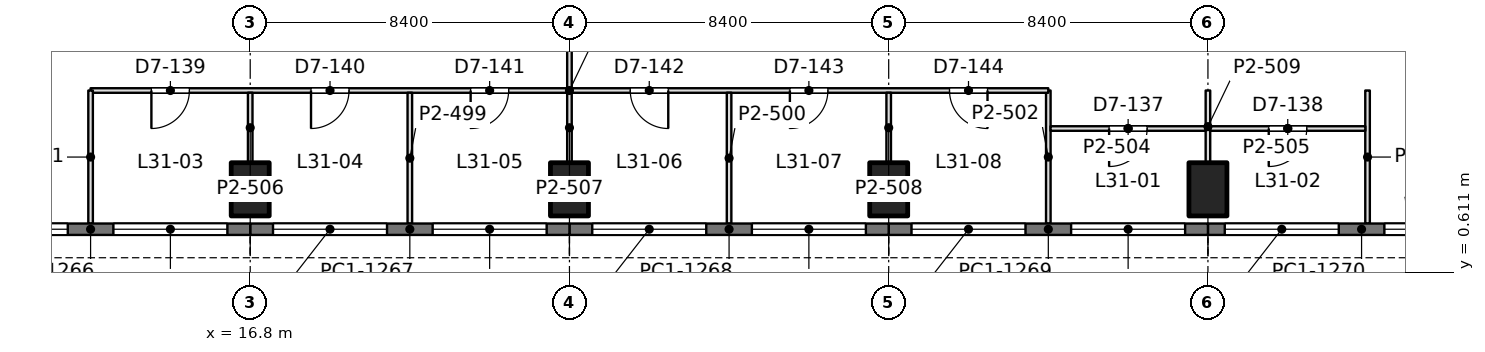
"""IFC4 building model, lengths in metres.
Left out: names, types, materials, properties, quantities, classifications, styles, units other than length and angle.
Written with IfcOpenShell. Run it as: python <this file> out.ifc"""

import sys

from ifc_helpers import new_model, si_unit, direction, frame, frame_2d, origin, origin_2d, place, context, subcontext, project, spatial, rectangle, extrude, element, fill, save


model = new_model("IFC4")
c1 = context("Model", 3, precision=1e-05, world=origin(), true_north=direction((0.0, 1.0)))
c2 = subcontext(c1, "Body", "Model", "MODEL_VIEW")
j1 = project(units=[si_unit("LENGTHUNIT", "METRE"), si_unit("PLANEANGLEUNIT", "RADIAN")], contexts=[c1])
p1 = place(None, origin())
s1 = spatial("IfcSite", under=j1, at=p1, CompositionType="ELEMENT")
p2 = place(p1, origin())
s2 = spatial("IfcBuilding", under=s1, at=p2, CompositionType="ELEMENT")
p3 = place(p2, frame((0.0, 0.0, 138.6)))
s3 = spatial("IfcBuildingStorey", under=s2, at=p3, CompositionType="ELEMENT", Elevation=138.6)
for number, where, z_axis, x_axis in (
    (1, (16.8, 2.8, 0.0), (0.0, 0.0, 1.0), (1.0, 0.0, 0.0)),
    (2, (25.2, 2.8, 0.0), (0.0, 0.0, 1.0), (1.0, 0.0, 0.0)),
    (3, (33.6, 2.8, 0.0), (0.0, 0.0, 1.0), (1.0, 0.0, 0.0)),
    (4, (42.0, 2.8, 0.0), (0.0, 0.0, 1.0), (1.0, 0.0, 0.0)),
):
    element("IfcColumn", number, at=place(p3, frame(where, z_axis=z_axis, x_axis=x_axis)), inside=s3, PredefinedType="COLUMN", context=c2, shape_type="SweptSolid", body=[
        extrude(rectangle(XDim=1.0, YDim=1.4, at=origin_2d()), origin(), (0.0, 0.0, 1.0), 4.2),
    ])
p4 = place(p3, frame((50.085, 1.75, 0.0), z_axis=(0.0, 0.0, 1.0), x_axis=(-1.0, 0.0, 0.0)))
e5 = element("IfcWall", 5, at=p4, inside=s3, PredefinedType="SOLIDWALL", context=c2, shape_type="SweptSolid", body=[
    extrude(rectangle(XDim=8.085, YDim=0.3, at=frame_2d((4.042, 0.0))), origin(), (0.0, 0.0, 1.0), 4.05),
])
p5 = place(p4, frame((0.443, 0.0, 0.9)))
e6 = element("IfcOpeningElement", 6, at=p5, cuts=e5, PredefinedType="OPENING", context=c2, shape_type="SweptSolid", body=[
    extrude(rectangle(XDim=3.0, YDim=1.9, at=frame_2d((1.5, 0.95))), frame((0.0, 0.16, 0.0), z_axis=(0.0, -1.0, 0.0), x_axis=(1.0, 0.0, 0.0)), (0.0, 0.0, 1.0), 0.32),
])
p6 = place(p4, frame((4.643, 0.0, 0.9)))
e7 = element("IfcOpeningElement", 7, at=p6, cuts=e5, PredefinedType="OPENING", context=c2, shape_type="SweptSolid", body=[
    extrude(rectangle(XDim=3.0, YDim=1.9, at=frame_2d((1.5, 0.95))), frame((0.0, 0.16, 0.0), z_axis=(0.0, -1.0, 0.0), x_axis=(1.0, 0.0, 0.0)), (0.0, 0.0, 1.0), 0.32),
])
p7 = place(p3, frame((42.0, 1.75, 0.0), z_axis=(0.0, 0.0, 1.0), x_axis=(-1.0, 0.0, 0.0)))
e8 = element("IfcWall", 8, at=p7, inside=s3, PredefinedType="SOLIDWALL", context=c2, shape_type="SweptSolid", body=[
    extrude(rectangle(XDim=8.4, YDim=0.3, at=frame_2d((4.2, 0.0))), origin(), (0.0, 0.0, 1.0), 4.05),
])
p8 = place(p7, frame((0.6, 0.0, 0.9)))
e9 = element("IfcOpeningElement", 9, at=p8, cuts=e8, PredefinedType="OPENING", context=c2, shape_type="SweptSolid", body=[
    extrude(rectangle(XDim=3.0, YDim=1.9, at=frame_2d((1.5, 0.95))), frame((0.0, 0.16, 0.0), z_axis=(0.0, -1.0, 0.0), x_axis=(1.0, 0.0, 0.0)), (0.0, 0.0, 1.0), 0.32),
])
p9 = place(p7, frame((4.8, 0.0, 0.9)))
e10 = element("IfcOpeningElement", 10, at=p9, cuts=e8, PredefinedType="OPENING", context=c2, shape_type="SweptSolid", body=[
    extrude(rectangle(XDim=3.0, YDim=1.9, at=frame_2d((1.5, 0.95))), frame((0.0, 0.16, 0.0), z_axis=(0.0, -1.0, 0.0), x_axis=(1.0, 0.0, 0.0)), (0.0, 0.0, 1.0), 0.32),
])
p10 = place(p3, frame((33.6, 1.75, 0.0), z_axis=(0.0, 0.0, 1.0), x_axis=(-1.0, 0.0, 0.0)))
e11 = element("IfcWall", 11, at=p10, inside=s3, PredefinedType="SOLIDWALL", context=c2, shape_type="SweptSolid", body=[
    extrude(rectangle(XDim=8.4, YDim=0.3, at=frame_2d((4.2, 0.0))), origin(), (0.0, 0.0, 1.0), 4.05),
])
p11 = place(p10, frame((0.6, 0.0, 0.9)))
e12 = element("IfcOpeningElement", 12, at=p11, cuts=e11, PredefinedType="OPENING", context=c2, shape_type="SweptSolid", body=[
    extrude(rectangle(XDim=3.0, YDim=1.9, at=frame_2d((1.5, 0.95))), frame((0.0, 0.16, 0.0), z_axis=(0.0, -1.0, 0.0), x_axis=(1.0, 0.0, 0.0)), (0.0, 0.0, 1.0), 0.32),
])
p12 = place(p10, frame((4.8, 0.0, 0.9)))
e13 = element("IfcOpeningElement", 13, at=p12, cuts=e11, PredefinedType="OPENING", context=c2, shape_type="SweptSolid", body=[
    extrude(rectangle(XDim=3.0, YDim=1.9, at=frame_2d((1.5, 0.95))), frame((0.0, 0.16, 0.0), z_axis=(0.0, -1.0, 0.0), x_axis=(1.0, 0.0, 0.0)), (0.0, 0.0, 1.0), 0.32),
])
p13 = place(p3, frame((25.2, 1.75, 0.0), z_axis=(0.0, 0.0, 1.0), x_axis=(-1.0, 0.0, 0.0)))
e14 = element("IfcWall", 14, at=p13, inside=s3, PredefinedType="SOLIDWALL", context=c2, shape_type="SweptSolid", body=[
    extrude(rectangle(XDim=8.4, YDim=0.3, at=frame_2d((4.2, 0.0))), origin(), (0.0, 0.0, 1.0), 4.05),
])
p14 = place(p13, frame((0.6, 0.0, 0.9)))
e15 = element("IfcOpeningElement", 15, at=p14, cuts=e14, PredefinedType="OPENING", context=c2, shape_type="SweptSolid", body=[
    extrude(rectangle(XDim=3.0, YDim=1.9, at=frame_2d((1.5, 0.95))), frame((0.0, 0.16, 0.0), z_axis=(0.0, -1.0, 0.0), x_axis=(1.0, 0.0, 0.0)), (0.0, 0.0, 1.0), 0.32),
])
p15 = place(p13, frame((4.8, 0.0, 0.9)))
e16 = element("IfcOpeningElement", 16, at=p15, cuts=e14, PredefinedType="OPENING", context=c2, shape_type="SweptSolid", body=[
    extrude(rectangle(XDim=3.0, YDim=1.9, at=frame_2d((1.5, 0.95))), frame((0.0, 0.16, 0.0), z_axis=(0.0, -1.0, 0.0), x_axis=(1.0, 0.0, 0.0)), (0.0, 0.0, 1.0), 0.32),
])
p16 = place(p3, frame((16.8, 1.75, 0.0), z_axis=(0.0, 0.0, 1.0), x_axis=(-1.0, 0.0, 0.0)))
e17 = element("IfcWall", 17, at=p16, inside=s3, PredefinedType="SOLIDWALL", context=c2, shape_type="SweptSolid", body=[
    extrude(rectangle(XDim=8.4, YDim=0.3, at=frame_2d((4.2, 0.0))), origin(), (0.0, 0.0, 1.0), 4.05),
])
p17 = place(p16, frame((0.6, 0.0, 0.9)))
e18 = element("IfcOpeningElement", 18, at=p17, cuts=e17, PredefinedType="OPENING", context=c2, shape_type="SweptSolid", body=[
    extrude(rectangle(XDim=3.0, YDim=1.9, at=frame_2d((1.5, 0.95))), frame((0.0, 0.16, 0.0), z_axis=(0.0, -1.0, 0.0), x_axis=(1.0, 0.0, 0.0)), (0.0, 0.0, 1.0), 0.32),
])
p18 = place(p16, frame((4.8, 0.0, 0.9)))
e19 = element("IfcOpeningElement", 19, at=p18, cuts=e17, PredefinedType="OPENING", context=c2, shape_type="SweptSolid", body=[
    extrude(rectangle(XDim=3.0, YDim=1.9, at=frame_2d((1.5, 0.95))), frame((0.0, 0.16, 0.0), z_axis=(0.0, -1.0, 0.0), x_axis=(1.0, 0.0, 0.0)), (0.0, 0.0, 1.0), 0.32),
])
p19 = place(p3, frame((37.858, 4.4, 0.0), z_axis=(0.0, 0.0, 1.0), x_axis=(1.0, 0.0, 0.0)))
e20 = element("IfcWall", 20, at=p19, inside=s3, PredefinedType="PARTITIONING", context=c2, shape_type="SweptSolid", body=[
    extrude(rectangle(XDim=4.084, YDim=0.12, at=frame_2d((2.042, 0.0))), origin(), (0.0, 0.0, 1.0), 3.55),
])
p20 = place(p19, frame((1.542, 0.0, 0.0)))
e21 = element("IfcOpeningElement", 21, at=p20, cuts=e20, PredefinedType="OPENING", context=c2, shape_type="SweptSolid", body=[
    extrude(rectangle(XDim=1.0, YDim=2.4, at=frame_2d((0.5, 1.2))), frame((0.0, 0.07, 0.0), z_axis=(0.0, -1.0, 0.0), x_axis=(1.0, 0.0, 0.0)), (0.0, 0.0, 1.0), 0.14),
])
p21 = place(p3, frame((42.058, 4.4, 0.0), z_axis=(0.0, 0.0, 1.0), x_axis=(1.0, 0.0, 0.0)))
e22 = element("IfcWall", 22, at=p21, inside=s3, PredefinedType="PARTITIONING", context=c2, shape_type="SweptSolid", body=[
    extrude(rectangle(XDim=4.084, YDim=0.12, at=frame_2d((2.042, 0.0))), origin(), (0.0, 0.0, 1.0), 3.55),
])
p22 = place(p21, frame((1.542, 0.0, 0.0)))
e23 = element("IfcOpeningElement", 23, at=p22, cuts=e22, PredefinedType="OPENING", context=c2, shape_type="SweptSolid", body=[
    extrude(rectangle(XDim=1.0, YDim=2.4, at=frame_2d((0.5, 1.2))), frame((0.0, 0.07, 0.0), z_axis=(0.0, -1.0, 0.0), x_axis=(1.0, 0.0, 0.0)), (0.0, 0.0, 1.0), 0.14),
])
p23 = place(p3, frame((12.6, 5.4, 0.0), z_axis=(0.0, 0.0, 1.0), x_axis=(1.0, 0.0, 0.0)))
e24 = element("IfcWall", 24, at=p23, inside=s3, PredefinedType="PARTITIONING", context=c2, shape_type="SweptSolid", body=[
    extrude(rectangle(XDim=25.2, YDim=0.12, at=frame_2d((12.6, 0.0))), origin(), (0.0, 0.0, 1.0), 3.55),
])
p24 = place(p23, frame((1.6, 0.0, 0.0)))
e25 = element("IfcOpeningElement", 25, at=p24, cuts=e24, PredefinedType="OPENING", context=c2, shape_type="SweptSolid", body=[
    extrude(rectangle(XDim=1.0, YDim=2.4, at=frame_2d((0.5, 1.2))), frame((0.0, 0.07, 0.0), z_axis=(0.0, -1.0, 0.0), x_axis=(1.0, 0.0, 0.0)), (0.0, 0.0, 1.0), 0.14),
])
p25 = place(p23, frame((5.8, 0.0, 0.0)))
e26 = element("IfcOpeningElement", 26, at=p25, cuts=e24, PredefinedType="OPENING", context=c2, shape_type="SweptSolid", body=[
    extrude(rectangle(XDim=1.0, YDim=2.4, at=frame_2d((0.5, 1.2))), frame((0.0, 0.07, 0.0), z_axis=(0.0, -1.0, 0.0), x_axis=(1.0, 0.0, 0.0)), (0.0, 0.0, 1.0), 0.14),
])
p26 = place(p23, frame((10.0, 0.0, 0.0)))
e27 = element("IfcOpeningElement", 27, at=p26, cuts=e24, PredefinedType="OPENING", context=c2, shape_type="SweptSolid", body=[
    extrude(rectangle(XDim=1.0, YDim=2.4, at=frame_2d((0.5, 1.2))), frame((0.0, 0.07, 0.0), z_axis=(0.0, -1.0, 0.0), x_axis=(1.0, 0.0, 0.0)), (0.0, 0.0, 1.0), 0.14),
])
p27 = place(p23, frame((14.2, 0.0, 0.0)))
e28 = element("IfcOpeningElement", 28, at=p27, cuts=e24, PredefinedType="OPENING", context=c2, shape_type="SweptSolid", body=[
    extrude(rectangle(XDim=1.0, YDim=2.4, at=frame_2d((0.5, 1.2))), frame((0.0, 0.07, 0.0), z_axis=(0.0, -1.0, 0.0), x_axis=(1.0, 0.0, 0.0)), (0.0, 0.0, 1.0), 0.14),
])
p28 = place(p23, frame((18.4, 0.0, 0.0)))
e29 = element("IfcOpeningElement", 29, at=p28, cuts=e24, PredefinedType="OPENING", context=c2, shape_type="SweptSolid", body=[
    extrude(rectangle(XDim=1.0, YDim=2.4, at=frame_2d((0.5, 1.2))), frame((0.0, 0.07, 0.0), z_axis=(0.0, -1.0, 0.0), x_axis=(1.0, 0.0, 0.0)), (0.0, 0.0, 1.0), 0.14),
])
p29 = place(p23, frame((22.6, 0.0, 0.0)))
e30 = element("IfcOpeningElement", 30, at=p29, cuts=e24, PredefinedType="OPENING", context=c2, shape_type="SweptSolid", body=[
    extrude(rectangle(XDim=1.0, YDim=2.4, at=frame_2d((0.5, 1.2))), frame((0.0, 0.07, 0.0), z_axis=(0.0, -1.0, 0.0), x_axis=(1.0, 0.0, 0.0)), (0.0, 0.0, 1.0), 0.14),
])
p30 = place(p3, frame((12.6, 1.898, 0.0), z_axis=(0.0, 0.0, 1.0), x_axis=(0.0, 1.0, 0.0)))
e31 = element("IfcWall", 31, at=p30, inside=s3, PredefinedType="PARTITIONING", context=c2, shape_type="SweptSolid", body=[
    extrude(rectangle(XDim=3.502, YDim=0.12, at=frame_2d((1.751, 0.0))), origin(), (0.0, 0.0, 1.0), 3.56),
])
p31 = place(p3, frame((16.8, 3.499, 0.0), z_axis=(0.0, 0.0, 1.0), x_axis=(0.0, 1.0, 0.0)))
e32 = element("IfcWall", 32, at=p31, inside=s3, PredefinedType="PARTITIONING", context=c2, shape_type="SweptSolid", body=[
    extrude(rectangle(XDim=1.843, YDim=0.12, at=frame_2d((0.921, 0.0))), origin(), (0.0, 0.0, 1.0), 3.55),
])
p32 = place(p3, frame((21.0, 1.898, 0.0), z_axis=(0.0, 0.0, 1.0), x_axis=(0.0, 1.0, 0.0)))
e33 = element("IfcWall", 33, at=p32, inside=s3, PredefinedType="PARTITIONING", context=c2, shape_type="SweptSolid", body=[
    extrude(rectangle(XDim=3.444, YDim=0.12, at=frame_2d((1.722, 0.0))), origin(), (0.0, 0.0, 1.0), 3.56),
])
p33 = place(p3, frame((25.2, 3.499, 0.0), z_axis=(0.0, 0.0, 1.0), x_axis=(0.0, 1.0, 0.0)))
e34 = element("IfcWall", 34, at=p33, inside=s3, PredefinedType="PARTITIONING", context=c2, shape_type="SweptSolid", body=[
    extrude(rectangle(XDim=1.843, YDim=0.12, at=frame_2d((0.921, 0.0))), origin(), (0.0, 0.0, 1.0), 3.55),
])
p34 = place(p3, frame((29.4, 1.898, 0.0), z_axis=(0.0, 0.0, 1.0), x_axis=(0.0, 1.0, 0.0)))
e35 = element("IfcWall", 35, at=p34, inside=s3, PredefinedType="PARTITIONING", context=c2, shape_type="SweptSolid", body=[
    extrude(rectangle(XDim=3.444, YDim=0.12, at=frame_2d((1.722, 0.0))), origin(), (0.0, 0.0, 1.0), 3.56),
])
p35 = place(p3, frame((33.6, 3.499, 0.0), z_axis=(0.0, 0.0, 1.0), x_axis=(0.0, 1.0, 0.0)))
e36 = element("IfcWall", 36, at=p35, inside=s3, PredefinedType="PARTITIONING", context=c2, shape_type="SweptSolid", body=[
    extrude(rectangle(XDim=1.843, YDim=0.12, at=frame_2d((0.921, 0.0))), origin(), (0.0, 0.0, 1.0), 3.55),
])
p36 = place(p3, frame((37.8, 1.898, 0.0), z_axis=(0.0, 0.0, 1.0), x_axis=(0.0, 1.0, 0.0)))
e37 = element("IfcWall", 37, at=p36, inside=s3, PredefinedType="PARTITIONING", context=c2, shape_type="SweptSolid", body=[
    extrude(rectangle(XDim=3.502, YDim=0.12, at=frame_2d((1.751, 0.0))), origin(), (0.0, 0.0, 1.0), 3.56),
])
p37 = place(p3, frame((42.0, 3.499, 0.0), z_axis=(0.0, 0.0, 1.0), x_axis=(0.0, 1.0, 0.0)))
e38 = element("IfcWall", 38, at=p37, inside=s3, PredefinedType="PARTITIONING", context=c2, shape_type="SweptSolid", body=[
    extrude(rectangle(XDim=1.901, YDim=0.12, at=frame_2d((0.95, 0.0))), origin(), (0.0, 0.0, 1.0), 3.55),
])
p38 = place(p3, frame((46.2, 1.898, 0.0), z_axis=(0.0, 0.0, 1.0), x_axis=(0.0, 1.0, 0.0)))
e39 = element("IfcWall", 39, at=p38, inside=s3, PredefinedType="PARTITIONING", context=c2, shape_type="SweptSolid", body=[
    extrude(rectangle(XDim=3.502, YDim=0.12, at=frame_2d((1.751, 0.0))), origin(), (0.0, 0.0, 1.0), 3.56),
])
p39 = place(p3, frame((25.2, 5.458, 0.0), z_axis=(0.0, 0.0, 1.0), x_axis=(0.0, 1.0, 0.0)))
e40 = element("IfcWall", 40, at=p39, inside=s3, PredefinedType="PARTITIONING", context=c2, shape_type="SweptSolid", body=[
    extrude(rectangle(XDim=2.243, YDim=0.12, at=frame_2d((1.122, 0.0))), origin(), (0.0, 0.0, 1.0), 3.55),
])
p40 = place(p5, origin())
e41 = element("IfcWindow", 41, at=p40, inside=s3, PartitioningType="SINGLE_PANEL", PredefinedType="WINDOW", context=c2, shape_type="SweptSolid", body=[
    extrude(rectangle(XDim=3.0, YDim=1.9, at=frame_2d((1.5, 0.95))), frame((0.0, 0.03, 0.0), z_axis=(0.0, -1.0, 0.0), x_axis=(1.0, 0.0, 0.0)), (0.0, 0.0, 1.0), 0.06),
])
fill(e6, e41)
p41 = place(p6, origin())
e42 = element("IfcWindow", 42, at=p41, inside=s3, PartitioningType="SINGLE_PANEL", PredefinedType="WINDOW", context=c2, shape_type="SweptSolid", body=[
    extrude(rectangle(XDim=3.0, YDim=1.9, at=frame_2d((1.5, 0.95))), frame((0.0, 0.03, 0.0), z_axis=(0.0, -1.0, 0.0), x_axis=(1.0, 0.0, 0.0)), (0.0, 0.0, 1.0), 0.06),
])
fill(e7, e42)
p42 = place(p8, origin())
e43 = element("IfcWindow", 43, at=p42, inside=s3, PartitioningType="SINGLE_PANEL", PredefinedType="WINDOW", context=c2, shape_type="SweptSolid", body=[
    extrude(rectangle(XDim=3.0, YDim=1.9, at=frame_2d((1.5, 0.95))), frame((0.0, 0.03, 0.0), z_axis=(0.0, -1.0, 0.0), x_axis=(1.0, 0.0, 0.0)), (0.0, 0.0, 1.0), 0.06),
])
fill(e9, e43)
p43 = place(p9, origin())
e44 = element("IfcWindow", 44, at=p43, inside=s3, PartitioningType="SINGLE_PANEL", PredefinedType="WINDOW", context=c2, shape_type="SweptSolid", body=[
    extrude(rectangle(XDim=3.0, YDim=1.9, at=frame_2d((1.5, 0.95))), frame((0.0, 0.03, 0.0), z_axis=(0.0, -1.0, 0.0), x_axis=(1.0, 0.0, 0.0)), (0.0, 0.0, 1.0), 0.06),
])
fill(e10, e44)
p44 = place(p11, origin())
e45 = element("IfcWindow", 45, at=p44, inside=s3, PartitioningType="SINGLE_PANEL", PredefinedType="WINDOW", context=c2, shape_type="SweptSolid", body=[
    extrude(rectangle(XDim=3.0, YDim=1.9, at=frame_2d((1.5, 0.95))), frame((0.0, 0.03, 0.0), z_axis=(0.0, -1.0, 0.0), x_axis=(1.0, 0.0, 0.0)), (0.0, 0.0, 1.0), 0.06),
])
fill(e12, e45)
p45 = place(p12, origin())
e46 = element("IfcWindow", 46, at=p45, inside=s3, PartitioningType="SINGLE_PANEL", PredefinedType="WINDOW", context=c2, shape_type="SweptSolid", body=[
    extrude(rectangle(XDim=3.0, YDim=1.9, at=frame_2d((1.5, 0.95))), frame((0.0, 0.03, 0.0), z_axis=(0.0, -1.0, 0.0), x_axis=(1.0, 0.0, 0.0)), (0.0, 0.0, 1.0), 0.06),
])
fill(e13, e46)
p46 = place(p14, origin())
e47 = element("IfcWindow", 47, at=p46, inside=s3, PartitioningType="SINGLE_PANEL", PredefinedType="WINDOW", context=c2, shape_type="SweptSolid", body=[
    extrude(rectangle(XDim=3.0, YDim=1.9, at=frame_2d((1.5, 0.95))), frame((0.0, 0.03, 0.0), z_axis=(0.0, -1.0, 0.0), x_axis=(1.0, 0.0, 0.0)), (0.0, 0.0, 1.0), 0.06),
])
fill(e15, e47)
p47 = place(p15, origin())
e48 = element("IfcWindow", 48, at=p47, inside=s3, PartitioningType="SINGLE_PANEL", PredefinedType="WINDOW", context=c2, shape_type="SweptSolid", body=[
    extrude(rectangle(XDim=3.0, YDim=1.9, at=frame_2d((1.5, 0.95))), frame((0.0, 0.03, 0.0), z_axis=(0.0, -1.0, 0.0), x_axis=(1.0, 0.0, 0.0)), (0.0, 0.0, 1.0), 0.06),
])
fill(e16, e48)
p48 = place(p17, origin())
e49 = element("IfcWindow", 49, at=p48, inside=s3, PartitioningType="SINGLE_PANEL", PredefinedType="WINDOW", context=c2, shape_type="SweptSolid", body=[
    extrude(rectangle(XDim=3.0, YDim=1.9, at=frame_2d((1.5, 0.95))), frame((0.0, 0.03, 0.0), z_axis=(0.0, -1.0, 0.0), x_axis=(1.0, 0.0, 0.0)), (0.0, 0.0, 1.0), 0.06),
])
fill(e18, e49)
p49 = place(p18, origin())
e50 = element("IfcWindow", 50, at=p49, inside=s3, PartitioningType="SINGLE_PANEL", PredefinedType="WINDOW", context=c2, shape_type="SweptSolid", body=[
    extrude(rectangle(XDim=3.0, YDim=1.9, at=frame_2d((1.5, 0.95))), frame((0.0, 0.03, 0.0), z_axis=(0.0, -1.0, 0.0), x_axis=(1.0, 0.0, 0.0)), (0.0, 0.0, 1.0), 0.06),
])
fill(e19, e50)
p50 = place(p20, frame((1.0, 0.0, 0.0), z_axis=(0.0, 0.0, 1.0), x_axis=(-1.0, 0.0, 0.0)))
e51 = element("IfcDoor", 51, at=p50, inside=s3, OperationType="SINGLE_SWING_RIGHT", PredefinedType="DOOR", context=c2, shape_type="SweptSolid", body=[
    extrude(rectangle(XDim=1.0, YDim=2.4, at=frame_2d((0.5, 1.2))), frame((0.0, 0.025, 0.0), z_axis=(0.0, -1.0, 0.0), x_axis=(1.0, 0.0, 0.0)), (0.0, 0.0, 1.0), 0.05),
])
fill(e21, e51)
p51 = place(p22, frame((1.0, 0.0, 0.0), z_axis=(0.0, 0.0, 1.0), x_axis=(-1.0, 0.0, 0.0)))
e52 = element("IfcDoor", 52, at=p51, inside=s3, OperationType="SINGLE_SWING_RIGHT", PredefinedType="DOOR", context=c2, shape_type="SweptSolid", body=[
    extrude(rectangle(XDim=1.0, YDim=2.4, at=frame_2d((0.5, 1.2))), frame((0.0, 0.025, 0.0), z_axis=(0.0, -1.0, 0.0), x_axis=(1.0, 0.0, 0.0)), (0.0, 0.0, 1.0), 0.05),
])
fill(e23, e52)
p52 = place(p24, frame((1.0, 0.0, 0.0), z_axis=(0.0, 0.0, 1.0), x_axis=(-1.0, 0.0, 0.0)))
e53 = element("IfcDoor", 53, at=p52, inside=s3, OperationType="SINGLE_SWING_RIGHT", PredefinedType="DOOR", context=c2, shape_type="SweptSolid", body=[
    extrude(rectangle(XDim=1.0, YDim=2.4, at=frame_2d((0.5, 1.2))), frame((0.0, 0.025, 0.0), z_axis=(0.0, -1.0, 0.0), x_axis=(1.0, 0.0, 0.0)), (0.0, 0.0, 1.0), 0.05),
])
fill(e25, e53)
p53 = place(p25, frame((1.0, 0.0, 0.0), z_axis=(0.0, 0.0, 1.0), x_axis=(-1.0, 0.0, 0.0)))
e54 = element("IfcDoor", 54, at=p53, inside=s3, OperationType="SINGLE_SWING_RIGHT", PredefinedType="DOOR", context=c2, shape_type="SweptSolid", body=[
    extrude(rectangle(XDim=1.0, YDim=2.4, at=frame_2d((0.5, 1.2))), frame((0.0, 0.025, 0.0), z_axis=(0.0, -1.0, 0.0), x_axis=(1.0, 0.0, 0.0)), (0.0, 0.0, 1.0), 0.05),
])
fill(e26, e54)
p54 = place(p26, frame((1.0, 0.0, 0.0), z_axis=(0.0, 0.0, 1.0), x_axis=(-1.0, 0.0, 0.0)))
e55 = element("IfcDoor", 55, at=p54, inside=s3, OperationType="SINGLE_SWING_RIGHT", PredefinedType="DOOR", context=c2, shape_type="SweptSolid", body=[
    extrude(rectangle(XDim=1.0, YDim=2.4, at=frame_2d((0.5, 1.2))), frame((0.0, 0.025, 0.0), z_axis=(0.0, -1.0, 0.0), x_axis=(1.0, 0.0, 0.0)), (0.0, 0.0, 1.0), 0.05),
])
fill(e27, e55)
p55 = place(p27, frame((1.0, 0.0, 0.0), z_axis=(0.0, 0.0, 1.0), x_axis=(-1.0, 0.0, 0.0)))
e56 = element("IfcDoor", 56, at=p55, inside=s3, OperationType="SINGLE_SWING_LEFT", PredefinedType="DOOR", context=c2, shape_type="SweptSolid", body=[
    extrude(rectangle(XDim=1.0, YDim=2.4, at=frame_2d((0.5, 1.2))), frame((0.0, 0.025, 0.0), z_axis=(0.0, -1.0, 0.0), x_axis=(1.0, 0.0, 0.0)), (0.0, 0.0, 1.0), 0.05),
])
fill(e28, e56)
p56 = place(p28, frame((1.0, 0.0, 0.0), z_axis=(0.0, 0.0, 1.0), x_axis=(-1.0, 0.0, 0.0)))
e57 = element("IfcDoor", 57, at=p56, inside=s3, OperationType="SINGLE_SWING_RIGHT", PredefinedType="DOOR", context=c2, shape_type="SweptSolid", body=[
    extrude(rectangle(XDim=1.0, YDim=2.4, at=frame_2d((0.5, 1.2))), frame((0.0, 0.025, 0.0), z_axis=(0.0, -1.0, 0.0), x_axis=(1.0, 0.0, 0.0)), (0.0, 0.0, 1.0), 0.05),
])
fill(e29, e57)
p57 = place(p29, frame((1.0, 0.0, 0.0), z_axis=(0.0, 0.0, 1.0), x_axis=(-1.0, 0.0, 0.0)))
e58 = element("IfcDoor", 58, at=p57, inside=s3, OperationType="SINGLE_SWING_LEFT", PredefinedType="DOOR", context=c2, shape_type="SweptSolid", body=[
    extrude(rectangle(XDim=1.0, YDim=2.4, at=frame_2d((0.5, 1.2))), frame((0.0, 0.025, 0.0), z_axis=(0.0, -1.0, 0.0), x_axis=(1.0, 0.0, 0.0)), (0.0, 0.0, 1.0), 0.05),
])
fill(e30, e58)
save(model, sys.argv[1])
